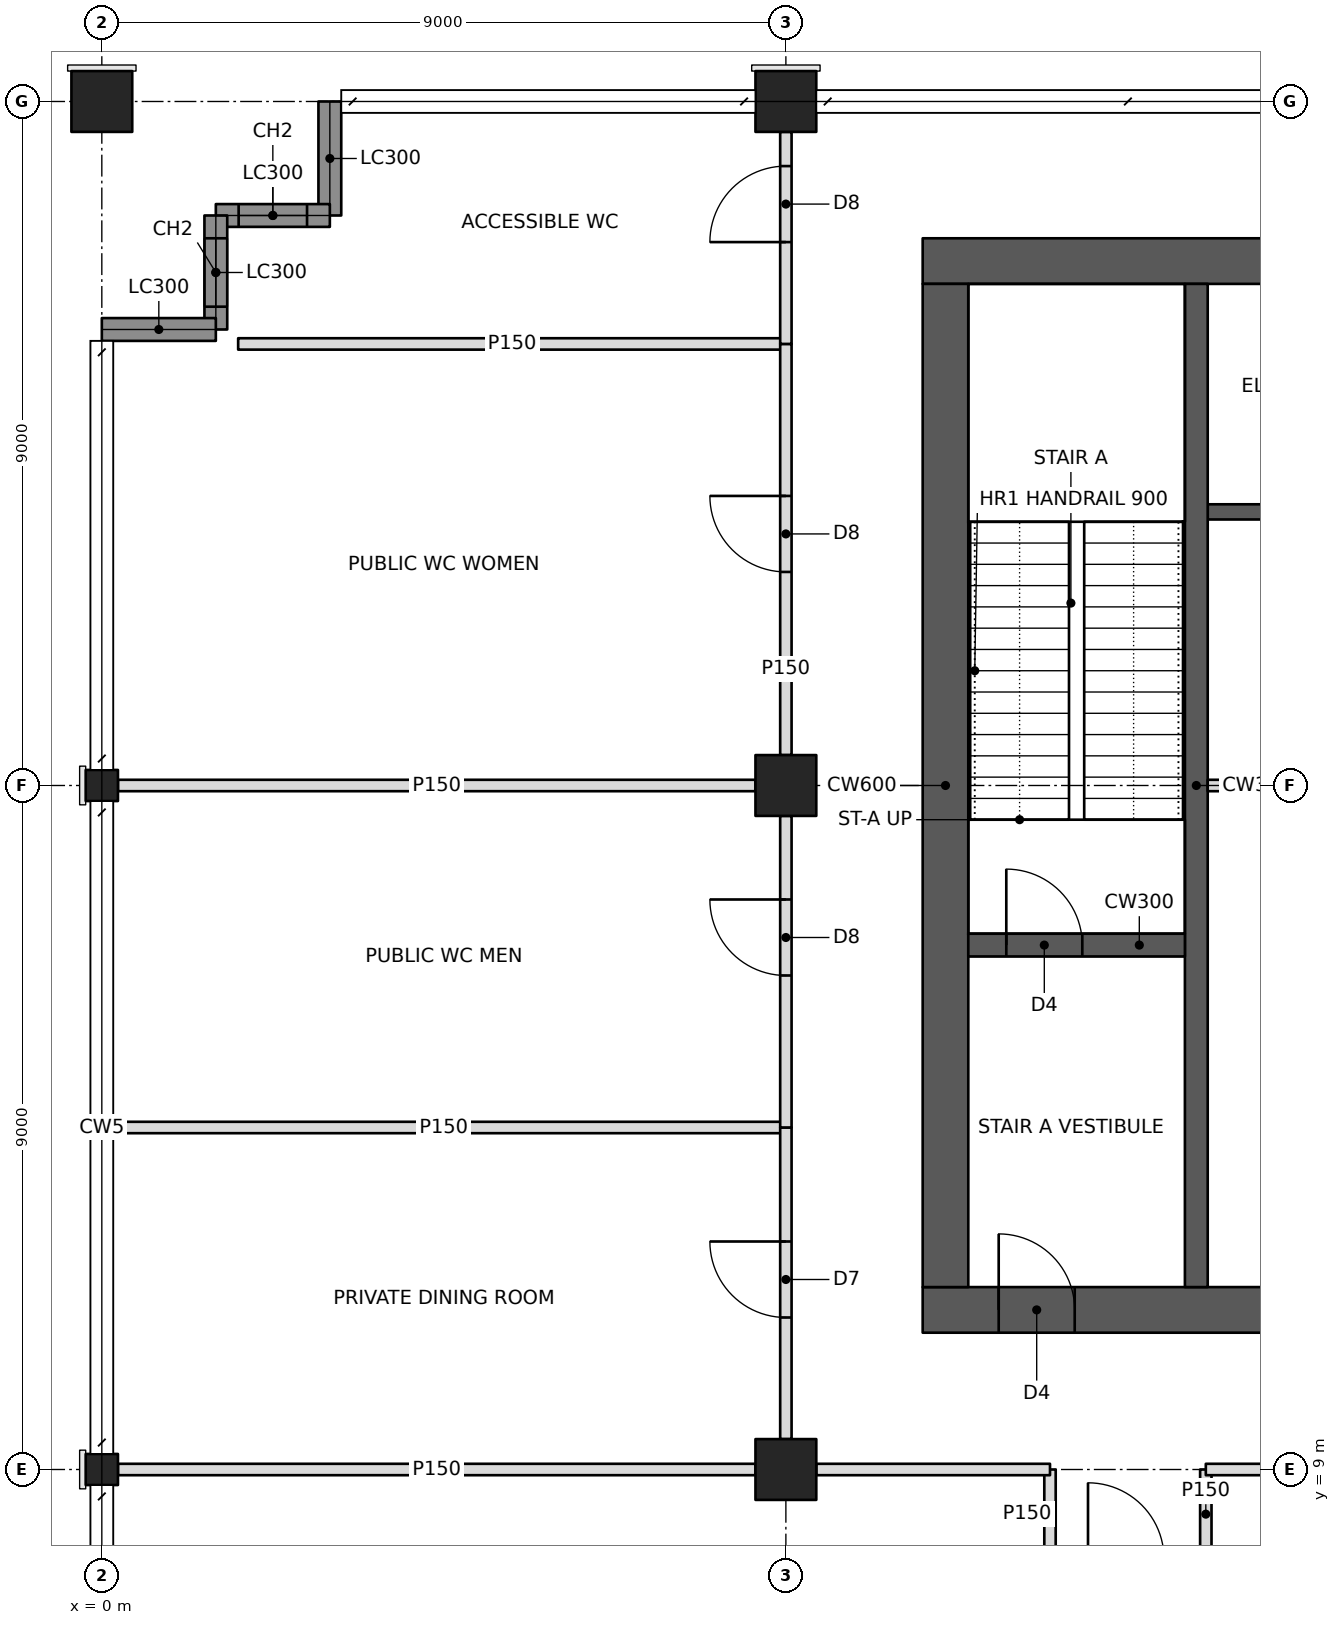
"""IFC4 building model, lengths in metres.
Left out: names, types, materials, properties, quantities, classifications, styles, units other than length and angle.
Written with IfcOpenShell. Run it as: python <this file> out.ifc"""

import sys

from ifc_helpers import new_model, si_unit, direction, frame, frame_2d, origin, origin_2d, place, context, subcontext, project, spatial, rectangle, hollow_rectangle, i_section, extrude, element, fill, save


model = new_model("IFC4")
c1 = context("Model", 3, precision=1e-05, world=origin(), true_north=direction((0.0, 1.0)))
c2 = subcontext(c1, "Body", "Model", "MODEL_VIEW")
j1 = project(units=[si_unit("LENGTHUNIT", "METRE"), si_unit("PLANEANGLEUNIT", "RADIAN")], contexts=[c1])
p1 = place(None, origin())
s1 = spatial("IfcSite", under=j1, at=p1, CompositionType="ELEMENT")
p2 = place(p1, origin())
s2 = spatial("IfcBuilding", under=s1, at=p2, CompositionType="ELEMENT")
p3 = place(p2, frame((0.0, 0.0, 269.8)))
s3 = spatial("IfcBuildingStorey", under=s2, at=p3, CompositionType="ELEMENT", Elevation=269.8)
for number, where, z_axis, x_axis in (
    (1, (0.0, 9.0, 0.0), (0.0, 0.0, 1.0), (0.0, 1.0, 0.0)),
    (2, (0.0, 18.0, 0.0), (0.0, 0.0, 1.0), (0.0, 1.0, 0.0)),
):
    element("IfcColumn", number, at=place(p3, frame(where, z_axis=z_axis, x_axis=x_axis)), inside=s3, PredefinedType="COLUMN", context=c2, shape_type="SweptSolid", body=[
        extrude(i_section(OverallWidth=0.409, OverallDepth=0.424, WebThickness=0.033, FlangeThickness=0.052, at=origin_2d()), origin(), (0.0, 0.0, 1.0), 5.0),
    ])
for number, where, z_axis, x_axis in (
    (3, (0.0, 27.0, 0.0), (0.0, 0.0, 1.0), (0.0, 1.0, 0.0)),
    (4, (9.0, 9.0, 0.0), (0.0, 0.0, 1.0), (1.0, 0.0, 0.0)),
    (5, (9.0, 18.0, 0.0), (0.0, 0.0, 1.0), (1.0, 0.0, 0.0)),
    (6, (9.0, 27.0, 0.0), (0.0, 0.0, 1.0), (1.0, 0.0, 0.0)),
):
    element("IfcColumn", number, at=place(p3, frame(where, z_axis=z_axis, x_axis=x_axis)), inside=s3, PredefinedType="COLUMN", context=c2, shape_type="SweptSolid", body=[
        extrude(hollow_rectangle(XDim=0.8, YDim=0.8, WallThickness=0.025, at=origin_2d()), origin(), (0.0, 0.0, 1.0), 5.0),
    ])
p4 = place(p3, frame((10.8, 11.1, 0.0), z_axis=(0.0, 0.0, 1.0), x_axis=(1.0, 0.0, 0.0)))
e7 = element("IfcWall", 7, at=p4, inside=s3, PredefinedType="SHEAR", context=c2, shape_type="SweptSolid", body=[
    extrude(rectangle(XDim=23.4, YDim=0.6, at=frame_2d((11.7, 0.0))), origin(), (0.0, 0.0, 1.0), 5.0),
])
p5 = place(p4, frame((1.0, 0.0, 0.0)))
e8 = element("IfcOpeningElement", 8, at=p5, cuts=e7, PredefinedType="OPENING", context=c2, shape_type="SweptSolid", body=[
    extrude(rectangle(XDim=1.0, YDim=2.1, at=frame_2d((0.5, 1.05))), frame((0.0, 0.31, 0.0), z_axis=(0.0, -1.0, 0.0), x_axis=(1.0, 0.0, 0.0)), (0.0, 0.0, 1.0), 0.62),
])
p6 = place(p4, frame((17.2, 0.0, 0.0)))
e9 = element("IfcOpeningElement", 9, at=p6, cuts=e7, PredefinedType="OPENING", context=c2, shape_type="SweptSolid", body=[
    extrude(rectangle(XDim=1.8, YDim=2.1, at=frame_2d((0.9, 1.05))), frame((0.0, 0.31, 0.0), z_axis=(0.0, -1.0, 0.0), x_axis=(1.0, 0.0, 0.0)), (0.0, 0.0, 1.0), 0.62),
])
p7 = place(p3, frame((10.8, 24.9, 0.0), z_axis=(0.0, 0.0, 1.0), x_axis=(1.0, 0.0, 0.0)))
e10 = element("IfcWall", 10, at=p7, inside=s3, PredefinedType="SHEAR", context=c2, shape_type="SweptSolid", body=[
    extrude(rectangle(XDim=23.4, YDim=0.6, at=frame_2d((11.7, 0.0))), origin(), (0.0, 0.0, 1.0), 5.0),
])
p8 = place(p7, frame((17.2, 0.0, 0.0)))
e11 = element("IfcOpeningElement", 11, at=p8, cuts=e10, PredefinedType="OPENING", context=c2, shape_type="SweptSolid", body=[
    extrude(rectangle(XDim=1.8, YDim=2.1, at=frame_2d((0.9, 1.05))), frame((0.0, 0.31, 0.0), z_axis=(0.0, -1.0, 0.0), x_axis=(1.0, 0.0, 0.0)), (0.0, 0.0, 1.0), 0.62),
])
p9 = place(p7, frame((21.1, 0.0, 0.0)))
e12 = element("IfcOpeningElement", 12, at=p9, cuts=e10, PredefinedType="OPENING", context=c2, shape_type="SweptSolid", body=[
    extrude(rectangle(XDim=1.0, YDim=2.1, at=frame_2d((0.5, 1.05))), frame((0.0, 0.31, 0.0), z_axis=(0.0, -1.0, 0.0), x_axis=(1.0, 0.0, 0.0)), (0.0, 0.0, 1.0), 0.62),
])
p10 = place(p7, frame((4.9, 0.0, 0.0)))
e13 = element("IfcOpeningElement", 13, at=p10, cuts=e10, PredefinedType="OPENING", context=c2, shape_type="SweptSolid", body=[
    extrude(rectangle(XDim=1.0, YDim=2.1, at=frame_2d((0.5, 1.05))), frame((0.0, 0.31, 0.0), z_axis=(0.0, -1.0, 0.0), x_axis=(1.0, 0.0, 0.0)), (0.0, 0.0, 1.0), 0.62),
])
p11 = place(p3, frame((11.1, 11.4, 0.0), z_axis=(0.0, 0.0, 1.0), x_axis=(0.0, 1.0, 0.0)))
e14 = element("IfcWall", 14, at=p11, inside=s3, PredefinedType="SHEAR", context=c2, shape_type="SweptSolid", body=[
    extrude(rectangle(XDim=13.2, YDim=0.6, at=frame_2d((6.6, 0.0))), origin(), (0.0, 0.0, 1.0), 5.0),
])
p12 = place(p3, frame((14.4, 11.4, 0.0), z_axis=(0.0, 0.0, 1.0), x_axis=(0.0, 1.0, 0.0)))
e15 = element("IfcWall", 15, at=p12, inside=s3, PredefinedType="SHEAR", context=c2, shape_type="SweptSolid", body=[
    extrude(rectangle(XDim=13.2, YDim=0.3, at=frame_2d((6.6, 0.0))), origin(), (0.0, 0.0, 1.0), 5.0),
])
p13 = place(p3, frame((11.4, 15.9, 0.0), z_axis=(0.0, 0.0, 1.0), x_axis=(1.0, 0.0, 0.0)))
e16 = element("IfcWall", 16, at=p13, inside=s3, PredefinedType="SHEAR", context=c2, shape_type="SweptSolid", body=[
    extrude(rectangle(XDim=2.85, YDim=0.3, at=frame_2d((1.425, 0.0))), origin(), (0.0, 0.0, 1.0), 5.0),
])
p14 = place(p13, frame((0.5, 0.0, 0.0)))
e17 = element("IfcOpeningElement", 17, at=p14, cuts=e16, PredefinedType="OPENING", context=c2, shape_type="SweptSolid", body=[
    extrude(rectangle(XDim=1.0, YDim=2.1, at=frame_2d((0.5, 1.05))), frame((0.0, 0.16, 0.0), z_axis=(0.0, -1.0, 0.0), x_axis=(1.0, 0.0, 0.0)), (0.0, 0.0, 1.0), 0.32),
])
p15 = place(p3, frame((14.55, 18.0, 0.0), z_axis=(0.0, 0.0, 1.0), x_axis=(1.0, 0.0, 0.0)))
e18 = element("IfcWall", 18, at=p15, inside=s3, PredefinedType="PARTITIONING", context=c2, shape_type="SweptSolid", body=[
    extrude(rectangle(XDim=3.3, YDim=0.15, at=frame_2d((1.65, 0.0))), origin(), (0.0, 0.0, 1.0), 4.75),
])
p16 = place(p3, frame((14.55, 21.6, 0.0), z_axis=(0.0, 0.0, 1.0), x_axis=(1.0, 0.0, 0.0)))
e19 = element("IfcWall", 19, at=p16, inside=s3, PredefinedType="SHEAR", context=c2, shape_type="SweptSolid", body=[
    extrude(rectangle(XDim=3.3, YDim=0.2, at=frame_2d((1.65, 0.0))), origin(), (0.0, 0.0, 1.0), 5.0),
])
p17 = place(p3, frame((3.0, 27.0, 0.0), z_axis=(0.0, 0.0, 1.0), x_axis=(0.0, -1.0, 0.0)))
e20 = element("IfcWall", 20, at=p17, inside=s3, PredefinedType="SOLIDWALL", context=c2, shape_type="SweptSolid", body=[
    extrude(rectangle(XDim=1.5, YDim=0.3, at=frame_2d((0.75, 0.0))), origin(), (0.0, 0.0, 1.0), 3.97),
])
p18 = place(p3, frame((3.0, 25.5, 0.0), z_axis=(0.0, 0.0, 1.0), x_axis=(-1.0, 0.0, 0.0)))
e21 = element("IfcWall", 21, at=p18, inside=s3, PredefinedType="SOLIDWALL", context=c2, shape_type="SweptSolid", body=[
    extrude(rectangle(XDim=1.5, YDim=0.3, at=frame_2d((0.75, 0.0))), origin(), (0.0, 0.0, 1.0), 4.142),
])
p19 = place(p18, frame((0.3, 0.0, 0.6)))
e22 = element("IfcOpeningElement", 22, at=p19, cuts=e21, PredefinedType="OPENING", context=c2, shape_type="SweptSolid", body=[
    extrude(rectangle(XDim=0.9, YDim=2.2, at=frame_2d((0.45, 1.1))), frame((0.0, 0.16, 0.0), z_axis=(0.0, -1.0, 0.0), x_axis=(1.0, 0.0, 0.0)), (0.0, 0.0, 1.0), 0.32),
])
p20 = place(p3, frame((1.5, 25.5, 0.0), z_axis=(0.0, 0.0, 1.0), x_axis=(0.0, -1.0, 0.0)))
e23 = element("IfcWall", 23, at=p20, inside=s3, PredefinedType="SOLIDWALL", context=c2, shape_type="SweptSolid", body=[
    extrude(rectangle(XDim=1.5, YDim=0.3, at=frame_2d((0.75, 0.0))), origin(), (0.0, 0.0, 1.0), 4.75),
])
p21 = place(p20, frame((0.3, 0.0, 0.6)))
e24 = element("IfcOpeningElement", 24, at=p21, cuts=e23, PredefinedType="OPENING", context=c2, shape_type="SweptSolid", body=[
    extrude(rectangle(XDim=0.9, YDim=2.2, at=frame_2d((0.45, 1.1))), frame((0.0, 0.16, 0.0), z_axis=(0.0, -1.0, 0.0), x_axis=(1.0, 0.0, 0.0)), (0.0, 0.0, 1.0), 0.32),
])
p22 = place(p3, frame((1.5, 24.0, 0.0), z_axis=(0.0, 0.0, 1.0), x_axis=(-1.0, 0.0, 0.0)))
e25 = element("IfcWall", 25, at=p22, inside=s3, PredefinedType="SOLIDWALL", context=c2, shape_type="SweptSolid", body=[
    extrude(rectangle(XDim=1.5, YDim=0.3, at=frame_2d((0.75, 0.0))), origin(), (0.0, 0.0, 1.0), 3.97),
])
p23 = place(p3, frame((0.212, 9.0, 0.0), z_axis=(0.0, 0.0, 1.0), x_axis=(1.0, 0.0, 0.0)))
e26 = element("IfcWall", 26, at=p23, inside=s3, PredefinedType="PARTITIONING", context=c2, shape_type="SweptSolid", body=[
    extrude(rectangle(XDim=8.388, YDim=0.15, at=frame_2d((4.194, 0.0))), origin(), (0.0, 0.0, 1.0), 3.802),
])
p24 = place(p3, frame((0.0, 13.5, 0.0), z_axis=(0.0, 0.0, 1.0), x_axis=(1.0, 0.0, 0.0)))
e27 = element("IfcWall", 27, at=p24, inside=s3, PredefinedType="PARTITIONING", context=c2, shape_type="SweptSolid", body=[
    extrude(rectangle(XDim=9.0, YDim=0.15, at=frame_2d((4.5, 0.0))), origin(), (0.0, 0.0, 1.0), 3.802),
])
p25 = place(p3, frame((0.212, 18.0, 0.0), z_axis=(0.0, 0.0, 1.0), x_axis=(1.0, 0.0, 0.0)))
e28 = element("IfcWall", 28, at=p25, inside=s3, PredefinedType="PARTITIONING", context=c2, shape_type="SweptSolid", body=[
    extrude(rectangle(XDim=8.388, YDim=0.15, at=frame_2d((4.194, 0.0))), origin(), (0.0, 0.0, 1.0), 3.802),
])
p26 = place(p3, frame((1.794, 23.81, 0.0), z_axis=(0.0, 0.0, 1.0), x_axis=(1.0, 0.0, 0.0)))
e29 = element("IfcWall", 29, at=p26, inside=s3, PredefinedType="PARTITIONING", context=c2, shape_type="SweptSolid", body=[
    extrude(rectangle(XDim=7.206, YDim=0.15, at=frame_2d((3.603, 0.0))), origin(), (0.0, 0.0, 1.0), 3.802),
])
p27 = place(p3, frame((9.4, 9.0, 0.0), z_axis=(0.0, 0.0, 1.0), x_axis=(1.0, 0.0, 0.0)))
e30 = element("IfcWall", 30, at=p27, inside=s3, PredefinedType="PARTITIONING", context=c2, shape_type="SweptSolid", body=[
    extrude(rectangle(XDim=3.075, YDim=0.15, at=frame_2d((1.538, 0.0))), origin(), (0.0, 0.0, 1.0), 3.802),
])
p28 = place(p3, frame((9.0, 13.5, 0.0), z_axis=(0.0, 0.0, 1.0), x_axis=(0.0, -1.0, 0.0)))
e31 = element("IfcWall", 31, at=p28, inside=s3, PredefinedType="PARTITIONING", context=c2, shape_type="SweptSolid", body=[
    extrude(rectangle(XDim=4.1, YDim=0.15, at=frame_2d((2.05, 0.0))), origin(), (0.0, 0.0, 1.0), 3.802),
])
p29 = place(p28, frame((1.5, 0.0, 0.0)))
e32 = element("IfcOpeningElement", 32, at=p29, cuts=e31, PredefinedType="OPENING", context=c2, shape_type="SweptSolid", body=[
    extrude(rectangle(XDim=1.0, YDim=2.1, at=frame_2d((0.5, 1.05))), frame((0.0, 0.085, 0.0), z_axis=(0.0, -1.0, 0.0), x_axis=(1.0, 0.0, 0.0)), (0.0, 0.0, 1.0), 0.17),
])
p30 = place(p3, frame((9.0, 17.6, 0.0), z_axis=(0.0, 0.0, 1.0), x_axis=(0.0, -1.0, 0.0)))
e33 = element("IfcWall", 33, at=p30, inside=s3, PredefinedType="PARTITIONING", context=c2, shape_type="SweptSolid", body=[
    extrude(rectangle(XDim=4.1, YDim=0.15, at=frame_2d((2.05, 0.0))), origin(), (0.0, 0.0, 1.0), 3.802),
])
p31 = place(p30, frame((1.1, 0.0, 0.0)))
e34 = element("IfcOpeningElement", 34, at=p31, cuts=e33, PredefinedType="OPENING", context=c2, shape_type="SweptSolid", body=[
    extrude(rectangle(XDim=1.0, YDim=2.1, at=frame_2d((0.5, 1.05))), frame((0.0, 0.085, 0.0), z_axis=(0.0, -1.0, 0.0), x_axis=(1.0, 0.0, 0.0)), (0.0, 0.0, 1.0), 0.17),
])
p32 = place(p3, frame((9.0, 23.81, 0.0), z_axis=(0.0, 0.0, 1.0), x_axis=(0.0, -1.0, 0.0)))
e35 = element("IfcWall", 35, at=p32, inside=s3, PredefinedType="PARTITIONING", context=c2, shape_type="SweptSolid", body=[
    extrude(rectangle(XDim=5.41, YDim=0.15, at=frame_2d((2.705, 0.0))), origin(), (0.0, 0.0, 1.0), 3.802),
])
p33 = place(p32, frame((2.0, 0.0, 0.0)))
e36 = element("IfcOpeningElement", 36, at=p33, cuts=e35, PredefinedType="OPENING", context=c2, shape_type="SweptSolid", body=[
    extrude(rectangle(XDim=1.0, YDim=2.1, at=frame_2d((0.5, 1.05))), frame((0.0, 0.085, 0.0), z_axis=(0.0, -1.0, 0.0), x_axis=(1.0, 0.0, 0.0)), (0.0, 0.0, 1.0), 0.17),
])
p34 = place(p3, frame((9.0, 26.6, 0.0), z_axis=(0.0, 0.0, 1.0), x_axis=(0.0, -1.0, 0.0)))
e37 = element("IfcWall", 37, at=p34, inside=s3, PredefinedType="PARTITIONING", context=c2, shape_type="SweptSolid", body=[
    extrude(rectangle(XDim=2.79, YDim=0.15, at=frame_2d((1.395, 0.0))), origin(), (0.0, 0.0, 1.0), 3.802),
])
p35 = place(p34, frame((0.45, 0.0, 0.0)))
e38 = element("IfcOpeningElement", 38, at=p35, cuts=e37, PredefinedType="OPENING", context=c2, shape_type="SweptSolid", body=[
    extrude(rectangle(XDim=1.0, YDim=2.1, at=frame_2d((0.5, 1.05))), frame((0.0, 0.085, 0.0), z_axis=(0.0, -1.0, 0.0), x_axis=(1.0, 0.0, 0.0)), (0.0, 0.0, 1.0), 0.17),
])
p36 = place(p3, frame((14.525, 9.0, 0.0), z_axis=(0.0, 0.0, 1.0), x_axis=(1.0, 0.0, 0.0)))
e39 = element("IfcWall", 39, at=p36, inside=s3, PredefinedType="PARTITIONING", context=c2, shape_type="SweptSolid", body=[
    extrude(rectangle(XDim=3.075, YDim=0.15, at=frame_2d((1.538, 0.0))), origin(), (0.0, 0.0, 1.0), 3.802),
])
for number, where, z_axis, x_axis in (
    (40, (12.475, 9.0, 0.0), (0.0, 0.0, 1.0), (0.0, -1.0, 0.0)),
    (41, (14.525, 9.0, 0.0), (0.0, 0.0, 1.0), (0.0, -1.0, 0.0)),
):
    element("IfcWall", number, at=place(p3, frame(where, z_axis=z_axis, x_axis=x_axis)), inside=s3, PredefinedType="PARTITIONING", context=c2, shape_type="SweptSolid", body=[
        extrude(rectangle(XDim=1.175, YDim=0.15, at=frame_2d((0.587, 0.0))), origin(), (0.0, 0.0, 1.0), 3.802),
    ])
p37 = place(p19, origin())
e42 = element("IfcWindow", 42, at=p37, inside=s3, PartitioningType="SINGLE_PANEL", PredefinedType="WINDOW", context=c2, shape_type="SweptSolid", body=[
    extrude(rectangle(XDim=0.9, YDim=2.2, at=frame_2d((0.45, 1.1))), frame((0.0, 0.03, 0.0), z_axis=(0.0, -1.0, 0.0), x_axis=(1.0, 0.0, 0.0)), (0.0, 0.0, 1.0), 0.06),
])
fill(e22, e42)
p38 = place(p21, origin())
e43 = element("IfcWindow", 43, at=p38, inside=s3, PartitioningType="SINGLE_PANEL", PredefinedType="WINDOW", context=c2, shape_type="SweptSolid", body=[
    extrude(rectangle(XDim=0.9, YDim=2.2, at=frame_2d((0.45, 1.1))), frame((0.0, 0.03, 0.0), z_axis=(0.0, -1.0, 0.0), x_axis=(1.0, 0.0, 0.0)), (0.0, 0.0, 1.0), 0.06),
])
fill(e24, e43)
p39 = place(p29, frame((1.0, 0.0, 0.0), z_axis=(0.0, 0.0, 1.0), x_axis=(-1.0, 0.0, 0.0)))
e44 = element("IfcDoor", 44, at=p39, inside=s3, OperationType="SINGLE_SWING_RIGHT", PredefinedType="DOOR", context=c2, shape_type="SweptSolid", body=[
    extrude(rectangle(XDim=1.0, YDim=2.1, at=frame_2d((0.5, 1.05))), frame((0.0, 0.025, 0.0), z_axis=(0.0, -1.0, 0.0), x_axis=(1.0, 0.0, 0.0)), (0.0, 0.0, 1.0), 0.05),
])
fill(e32, e44)
p40 = place(p31, frame((1.0, 0.0, 0.0), z_axis=(0.0, 0.0, 1.0), x_axis=(-1.0, 0.0, 0.0)))
e45 = element("IfcDoor", 45, at=p40, inside=s3, OperationType="SINGLE_SWING_RIGHT", PredefinedType="DOOR", context=c2, shape_type="SweptSolid", body=[
    extrude(rectangle(XDim=1.0, YDim=2.1, at=frame_2d((0.5, 1.05))), frame((0.0, 0.025, 0.0), z_axis=(0.0, -1.0, 0.0), x_axis=(1.0, 0.0, 0.0)), (0.0, 0.0, 1.0), 0.05),
])
fill(e34, e45)
p41 = place(p33, frame((1.0, 0.0, 0.0), z_axis=(0.0, 0.0, 1.0), x_axis=(-1.0, 0.0, 0.0)))
e46 = element("IfcDoor", 46, at=p41, inside=s3, OperationType="SINGLE_SWING_RIGHT", PredefinedType="DOOR", context=c2, shape_type="SweptSolid", body=[
    extrude(rectangle(XDim=1.0, YDim=2.1, at=frame_2d((0.5, 1.05))), frame((0.0, 0.025, 0.0), z_axis=(0.0, -1.0, 0.0), x_axis=(1.0, 0.0, 0.0)), (0.0, 0.0, 1.0), 0.05),
])
fill(e36, e46)
p42 = place(p35, frame((1.0, 0.0, 0.0), z_axis=(0.0, 0.0, 1.0), x_axis=(-1.0, 0.0, 0.0)))
e47 = element("IfcDoor", 47, at=p42, inside=s3, OperationType="SINGLE_SWING_LEFT", PredefinedType="DOOR", context=c2, shape_type="SweptSolid", body=[
    extrude(rectangle(XDim=1.0, YDim=2.1, at=frame_2d((0.5, 1.05))), frame((0.0, 0.025, 0.0), z_axis=(0.0, -1.0, 0.0), x_axis=(1.0, 0.0, 0.0)), (0.0, 0.0, 1.0), 0.05),
])
fill(e38, e47)
p43 = place(p5, origin())
e48 = element("IfcDoor", 48, at=p43, inside=s3, OperationType="SINGLE_SWING_LEFT", PredefinedType="DOOR", context=c2, shape_type="SweptSolid", body=[
    extrude(rectangle(XDim=1.0, YDim=2.1, at=frame_2d((0.5, 1.05))), frame((0.0, 0.025, 0.0), z_axis=(0.0, -1.0, 0.0), x_axis=(1.0, 0.0, 0.0)), (0.0, 0.0, 1.0), 0.05),
])
fill(e8, e48)
p44 = place(p14, origin())
e49 = element("IfcDoor", 49, at=p44, inside=s3, OperationType="SINGLE_SWING_LEFT", PredefinedType="DOOR", context=c2, shape_type="SweptSolid", body=[
    extrude(rectangle(XDim=1.0, YDim=2.1, at=frame_2d((0.5, 1.05))), frame((0.0, 0.025, 0.0), z_axis=(0.0, -1.0, 0.0), x_axis=(1.0, 0.0, 0.0)), (0.0, 0.0, 1.0), 0.05),
])
fill(e17, e49)
save(model, sys.argv[1])
